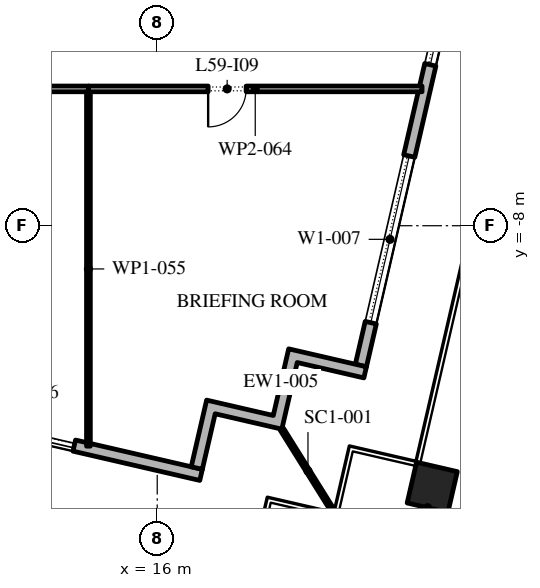
"""IFC4 building model, lengths in metres.
Left out: names, types, materials, properties, quantities, classifications, styles, units other than length and angle.
Written with IfcOpenShell. Run it as: python <this file> out.ifc"""

import sys

from ifc_helpers import new_model, si_unit, direction, frame, frame_2d, origin, origin_2d, place, context, subcontext, project, spatial, polyline, rectangle, outline, extrude, element, fill, save


model = new_model("IFC4")
c1 = context("Model", 3, precision=1e-05, world=origin(), true_north=direction((0.0, 1.0)))
c2 = subcontext(c1, "Body", "Model", "MODEL_VIEW")
j1 = project(units=[si_unit("LENGTHUNIT", "METRE"), si_unit("PLANEANGLEUNIT", "RADIAN")], contexts=[c1])
p1 = place(None, origin())
s1 = spatial("IfcSite", under=j1, at=p1, CompositionType="ELEMENT")
p2 = place(p1, origin())
s2 = spatial("IfcBuilding", under=s1, at=p2, CompositionType="ELEMENT")
p3 = place(p2, frame((0.0, 0.0, 272.4)))
s3 = spatial("IfcBuildingStorey", under=s2, at=p3, CompositionType="ELEMENT", Elevation=272.4)
p4 = place(p3, frame((23.236, -14.883, 0.0), z_axis=(0.0, 0.0, 1.0), x_axis=(0.974370064785, -0.224951054344, 0.0)))
e1 = element("IfcColumn", 1, at=p4, inside=s3, PredefinedType="COLUMN", context=c2, shape_type="SweptSolid", body=[
    extrude(rectangle(XDim=1.1, YDim=1.1, at=origin_2d()), origin(), (0.0, 0.0, 1.0), 4.2),
])
p5 = place(p3, frame((-29.616, -3.758, 0.0), z_axis=(0.0, 0.0, 1.0), x_axis=(0.974370532314, -0.224949029246, 0.0)))
e2 = element("IfcWall", 2, at=p5, inside=s3, PredefinedType="STANDARD", context=c2, shape_type="SweptSolid", body=[
    extrude(rectangle(XDim=48.0, YDim=0.3, at=frame_2d((24.0, 0.0))), origin(), (0.0, 0.0, 1.0), 4.0),
])
p6 = place(p5, frame((1.625, 0.0, 0.45)))
e3 = element("IfcOpeningElement", 3, at=p6, cuts=e2, PredefinedType="OPENING", context=c2, shape_type="SweptSolid", body=[
    extrude(rectangle(XDim=4.5, YDim=3.05, at=frame_2d((2.25, 1.525))), frame((0.0, 0.16, 0.0), z_axis=(0.0, -1.0, 0.0), x_axis=(1.0, 0.0, 0.0)), (0.0, 0.0, 1.0), 0.32),
])
p7 = place(p5, frame((10.575, 0.0, 0.0)))
e4 = element("IfcOpeningElement", 4, at=p7, cuts=e2, PredefinedType="OPENING", context=c2, shape_type="SweptSolid", body=[
    extrude(rectangle(XDim=2.4, YDim=3.5, at=frame_2d((1.2, 1.75))), frame((0.0, 0.16, 0.0), z_axis=(0.0, -1.0, 0.0), x_axis=(1.0, 0.0, 0.0)), (0.0, 0.0, 1.0), 0.32),
])
p8 = place(p5, frame((17.575, 0.0, 0.45)))
e5 = element("IfcOpeningElement", 5, at=p8, cuts=e2, PredefinedType="OPENING", context=c2, shape_type="SweptSolid", body=[
    extrude(rectangle(XDim=4.5, YDim=3.0, at=frame_2d((2.25, 1.5))), frame((0.0, 0.16, 0.0), z_axis=(0.0, -1.0, 0.0), x_axis=(1.0, 0.0, 0.0)), (0.0, 0.0, 1.0), 0.32),
])
p9 = place(p5, frame((25.625, 0.0, 0.45)))
e6 = element("IfcOpeningElement", 6, at=p9, cuts=e2, PredefinedType="OPENING", context=c2, shape_type="SweptSolid", body=[
    extrude(rectangle(XDim=4.5, YDim=2.95, at=frame_2d((2.25, 1.475))), frame((0.0, 0.16, 0.0), z_axis=(0.0, -1.0, 0.0), x_axis=(1.0, 0.0, 0.0)), (0.0, 0.0, 1.0), 0.32),
])
p10 = place(p5, frame((33.675, 0.0, 0.45)))
e7 = element("IfcOpeningElement", 7, at=p10, cuts=e2, PredefinedType="OPENING", context=c2, shape_type="SweptSolid", body=[
    extrude(rectangle(XDim=4.5, YDim=2.825, at=frame_2d((2.25, 1.413))), frame((0.0, 0.16, 0.0), z_axis=(0.0, -1.0, 0.0), x_axis=(1.0, 0.0, 0.0)), (0.0, 0.0, 1.0), 0.32),
])
p11 = place(p5, frame((42.175, 0.0, 0.0)))
e8 = element("IfcOpeningElement", 8, at=p11, cuts=e2, PredefinedType="OPENING", context=c2, shape_type="SweptSolid", body=[
    extrude(rectangle(XDim=2.4, YDim=3.5, at=frame_2d((1.2, 1.75))), frame((0.0, 0.16, 0.0), z_axis=(0.0, -1.0, 0.0), x_axis=(1.0, 0.0, 0.0)), (0.0, 0.0, 1.0), 0.32),
])
p12 = place(p3, frame((21.359, -11.678, 0.0), z_axis=(0.0, 0.0, 1.0), x_axis=(0.224949198343, 0.974370493275, 0.0)))
e9 = element("IfcWall", 9, at=p12, inside=s3, PredefinedType="STANDARD", context=c2, shape_type="SweptSolid", body=[
    extrude(rectangle(XDim=49.5, YDim=0.3, at=frame_2d((24.75, 0.0))), origin(), (0.0, 0.0, 1.0), 4.0),
])
p13 = place(p12, frame((1.157, 0.0, 0.45)))
e10 = element("IfcOpeningElement", 10, at=p13, cuts=e9, PredefinedType="OPENING", context=c2, shape_type="SweptSolid", body=[
    extrude(rectangle(XDim=4.5, YDim=3.05, at=frame_2d((2.25, 1.525))), frame((0.0, 0.16, 0.0), z_axis=(0.0, -1.0, 0.0), x_axis=(1.0, 0.0, 0.0)), (0.0, 0.0, 1.0), 0.32),
])
p14 = place(p12, frame((8.121, 0.0, 0.45)))
e11 = element("IfcOpeningElement", 11, at=p14, cuts=e9, PredefinedType="OPENING", context=c2, shape_type="SweptSolid", body=[
    extrude(rectangle(XDim=4.5, YDim=3.05, at=frame_2d((2.25, 1.525))), frame((0.0, 0.16, 0.0), z_axis=(0.0, -1.0, 0.0), x_axis=(1.0, 0.0, 0.0)), (0.0, 0.0, 1.0), 0.32),
])
p15 = place(p12, frame((15.236, 0.0, 0.45)))
e12 = element("IfcOpeningElement", 12, at=p15, cuts=e9, PredefinedType="OPENING", context=c2, shape_type="SweptSolid", body=[
    extrude(rectangle(XDim=4.5, YDim=3.05, at=frame_2d((2.25, 1.525))), frame((0.0, 0.16, 0.0), z_axis=(0.0, -1.0, 0.0), x_axis=(1.0, 0.0, 0.0)), (0.0, 0.0, 1.0), 0.32),
])
p16 = place(p12, frame((22.35, 0.0, 0.45)))
e13 = element("IfcOpeningElement", 13, at=p16, cuts=e9, PredefinedType="OPENING", context=c2, shape_type="SweptSolid", body=[
    extrude(rectangle(XDim=4.5, YDim=3.05, at=frame_2d((2.25, 1.525))), frame((0.0, 0.16, 0.0), z_axis=(0.0, -1.0, 0.0), x_axis=(1.0, 0.0, 0.0)), (0.0, 0.0, 1.0), 0.32),
])
p17 = place(p12, frame((29.464, 0.0, 0.45)))
e14 = element("IfcOpeningElement", 14, at=p17, cuts=e9, PredefinedType="OPENING", context=c2, shape_type="SweptSolid", body=[
    extrude(rectangle(XDim=4.5, YDim=2.95, at=frame_2d((2.25, 1.475))), frame((0.0, 0.16, 0.0), z_axis=(0.0, -1.0, 0.0), x_axis=(1.0, 0.0, 0.0)), (0.0, 0.0, 1.0), 0.32),
])
p18 = place(p12, frame((37.628, 0.0, 0.0)))
e15 = element("IfcOpeningElement", 15, at=p18, cuts=e9, PredefinedType="OPENING", context=c2, shape_type="SweptSolid", body=[
    extrude(rectangle(XDim=2.4, YDim=3.325, at=frame_2d((1.2, 1.663))), frame((0.0, 0.16, 0.0), z_axis=(0.0, -1.0, 0.0), x_axis=(1.0, 0.0, 0.0)), (0.0, 0.0, 1.0), 0.32),
])
p19 = place(p12, frame((43.693, 0.0, 0.45)))
e16 = element("IfcOpeningElement", 16, at=p19, cuts=e9, PredefinedType="OPENING", context=c2, shape_type="SweptSolid", body=[
    extrude(rectangle(XDim=4.5, YDim=3.05, at=frame_2d((2.25, 1.525))), frame((0.0, 0.16, 0.0), z_axis=(0.0, -1.0, 0.0), x_axis=(1.0, 0.0, 0.0)), (0.0, 0.0, 1.0), 0.32),
])
p20 = place(p3, origin())
e17 = element("IfcWall", 17, at=p20, inside=s3, PredefinedType="STANDARD", context=c2, shape_type="SweptSolid", body=[
    extrude(outline(polyline([(19.054, -12.993), (19.459, -11.24), (21.505, -11.712), (21.438, -12.004), (19.684, -11.599), (19.279, -13.353), (17.525, -12.948), (17.188, -14.41), (16.895, -14.342), (17.3, -12.588), (19.054, -12.993)])), origin(), (0.0, 0.0, 1.0), 4.0),
])
p21 = place(p3, frame((19.279, -13.353, -0.05), z_axis=(0.0, 0.0, 1.0), x_axis=(0.529914407191, -0.848051131154, 0.0)))
e18 = element("IfcWall", 18, at=p21, inside=s3, PredefinedType="STANDARD", context=c2, shape_type="SweptSolid", body=[
    extrude(rectangle(XDim=2.596, YDim=0.1, at=frame_2d((1.298, 0.0))), origin(), (0.0, 0.0, 1.0), 4.05),
])
p22 = place(p3, frame((14.19, -4.4, 0.0), z_axis=(0.0, 0.0, 1.0), x_axis=(-1.0, 0.0, 0.0)))
e19 = element("IfcWall", 19, at=p22, inside=s3, PredefinedType="PARTITIONING", context=c2, shape_type="SweptSolid", body=[
    extrude(rectangle(XDim=4.115, YDim=0.15, at=frame_2d((2.058, 0.0))), origin(), (0.0, 0.0, 1.0), 4.0),
])
p23 = place(p3, frame((14.19, -4.475, 0.0), z_axis=(0.0, 0.0, 1.0), x_axis=(0.0, -1.0, 0.0)))
e20 = element("IfcWall", 20, at=p23, inside=s3, PredefinedType="PARTITIONING", context=c2, shape_type="SweptSolid", body=[
    extrude(rectangle(XDim=9.325, YDim=0.1, at=frame_2d((4.663, 0.0))), origin(), (0.0, 0.0, 1.0), 4.0),
])
p24 = place(p3, frame((22.968, -4.4, 0.0), z_axis=(0.0, 0.0, 1.0), x_axis=(-1.0, 0.0, 0.0)))
e21 = element("IfcWall", 21, at=p24, inside=s3, PredefinedType="PARTITIONING", context=c2, shape_type="SweptSolid", body=[
    extrude(rectangle(XDim=8.778, YDim=0.15, at=frame_2d((4.389, 0.0))), origin(), (0.0, 0.0, 1.0), 4.0),
])
p25 = place(p24, frame((4.628, 0.0, 0.0)))
e22 = element("IfcOpeningElement", 22, at=p25, cuts=e21, PredefinedType="OPENING", context=c2, shape_type="SweptSolid", body=[
    extrude(rectangle(XDim=1.0, YDim=2.1, at=frame_2d((0.5, 1.05))), frame((0.0, 0.085, 0.0), z_axis=(0.0, -1.0, 0.0), x_axis=(1.0, 0.0, 0.0)), (0.0, 0.0, 1.0), 0.17),
])
p26 = place(p11, origin())
e23 = element("IfcDoor", 23, at=p26, inside=s3, OperationType="DOUBLE_DOOR_SLIDING", PredefinedType="DOOR", context=c2, shape_type="SweptSolid", body=[
    extrude(rectangle(XDim=2.4, YDim=3.5, at=frame_2d((1.2, 1.75))), frame((0.0, 0.025, 0.0), z_axis=(0.0, -1.0, 0.0), x_axis=(1.0, 0.0, 0.0)), (0.0, 0.0, 1.0), 0.05),
])
fill(e8, e23)
p27 = place(p13, origin())
e24 = element("IfcWindow", 24, at=p27, inside=s3, PartitioningType="DOUBLE_PANEL_VERTICAL", PredefinedType="WINDOW", context=c2, shape_type="SweptSolid", body=[
    extrude(rectangle(XDim=4.5, YDim=3.05, at=frame_2d((2.25, 1.525))), frame((0.0, 0.03, 0.0), z_axis=(0.0, -1.0, 0.0), x_axis=(1.0, 0.0, 0.0)), (0.0, 0.0, 1.0), 0.06),
])
fill(e10, e24)
p28 = place(p14, origin())
e25 = element("IfcWindow", 25, at=p28, inside=s3, PartitioningType="DOUBLE_PANEL_VERTICAL", PredefinedType="WINDOW", context=c2, shape_type="SweptSolid", body=[
    extrude(rectangle(XDim=4.5, YDim=3.05, at=frame_2d((2.25, 1.525))), frame((0.0, 0.03, 0.0), z_axis=(0.0, -1.0, 0.0), x_axis=(1.0, 0.0, 0.0)), (0.0, 0.0, 1.0), 0.06),
])
fill(e11, e25)
p29 = place(p25, origin())
e26 = element("IfcDoor", 26, at=p29, inside=s3, OperationType="SINGLE_SWING_LEFT", PredefinedType="DOOR", context=c2, shape_type="SweptSolid", body=[
    extrude(rectangle(XDim=1.0, YDim=2.1, at=frame_2d((0.5, 1.05))), frame((0.0, 0.025, 0.0), z_axis=(0.0, -1.0, 0.0), x_axis=(1.0, 0.0, 0.0)), (0.0, 0.0, 1.0), 0.05),
])
fill(e22, e26)
save(model, sys.argv[1])
